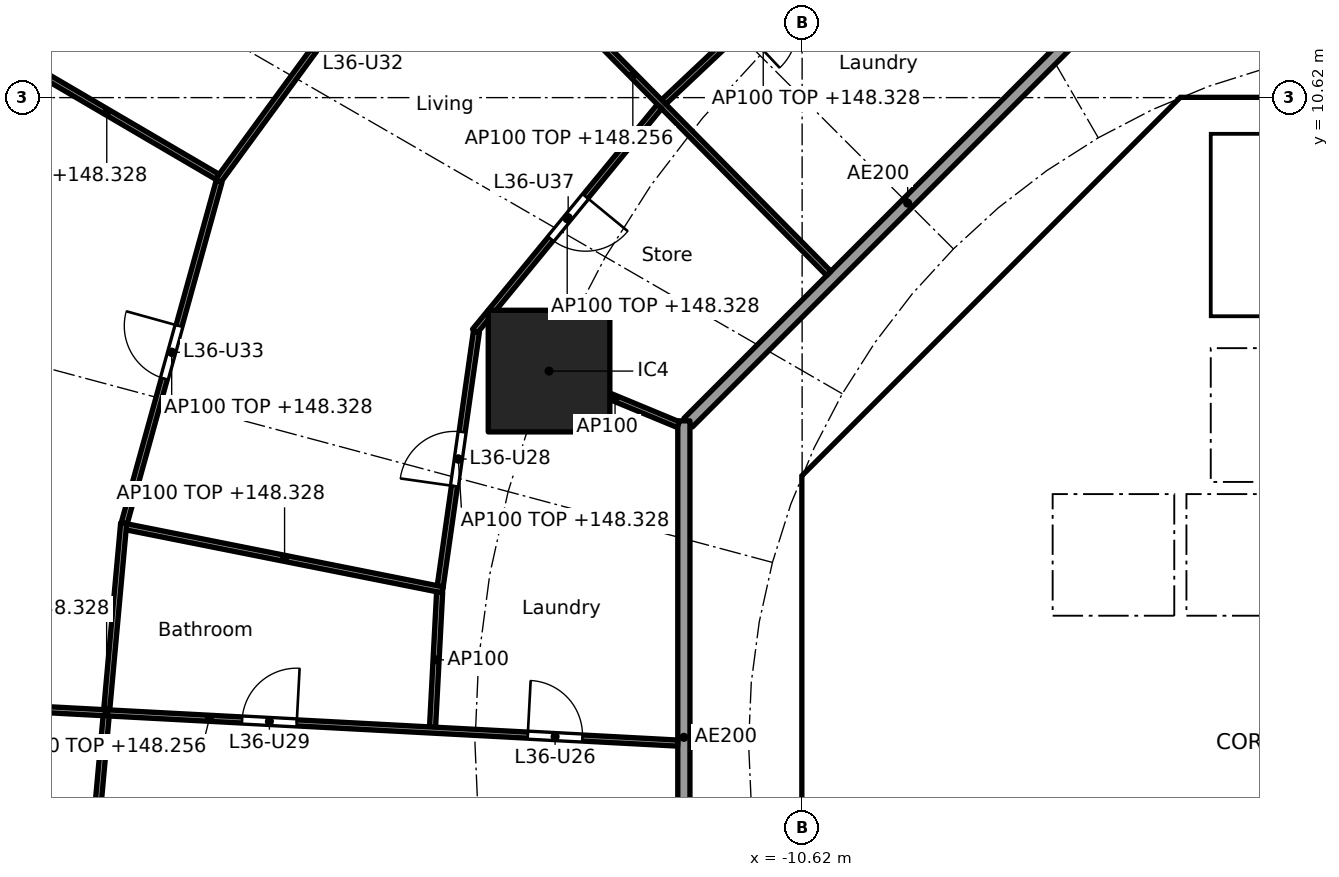
"""IFC4 building model, lengths in metres.
Left out: names, types, materials, properties, quantities, classifications, styles, units other than length and angle.
Written with IfcOpenShell. Run it as: python <this file> out.ifc"""

import sys

from ifc_helpers import new_model, si_unit, direction, frame, frame_2d, origin, origin_2d, place, context, subcontext, project, spatial, polyline, rectangle, outline, extrude, element, fill, save


model = new_model("IFC4")
c1 = context("Model", 3, precision=1e-05, world=origin(), true_north=direction((0.0, 1.0)))
c2 = subcontext(c1, "Body", "Model", "MODEL_VIEW")
j1 = project(units=[si_unit("LENGTHUNIT", "METRE"), si_unit("PLANEANGLEUNIT", "RADIAN")], contexts=[c1])
p1 = place(None, origin())
s1 = spatial("IfcSite", under=j1, at=p1, CompositionType="ELEMENT")
p2 = place(p1, origin())
s2 = spatial("IfcBuilding", under=s1, at=p2, CompositionType="ELEMENT")
p3 = place(p2, frame((0.0, 0.0, 145.5)))
s3 = spatial("IfcBuildingStorey", under=s2, at=p3, CompositionType="ELEMENT", Elevation=145.5)
p4 = place(p3, frame((-14.782, 6.123, 0.0), z_axis=(0.0, 0.0, 1.0), x_axis=(1.0, 0.0, 0.0)))
e1 = element("IfcColumn", 1, at=p4, inside=s3, PredefinedType="COLUMN", context=c2, shape_type="SweptSolid", body=[
    extrude(rectangle(XDim=2.0, YDim=2.0, at=origin_2d()), origin(), (0.0, 0.0, 1.0), 3.7),
])
p5 = place(p3, frame((-4.613, 9.988, 0.0), z_axis=(0.0, 0.0, 1.0), x_axis=(-0.707106781187, -0.707106781187, 0.0)))
e2 = element("IfcWall", 2, at=p5, inside=s3, PredefinedType="SHEAR", context=c2, shape_type="SweptSolid", body=[
    extrude(rectangle(XDim=7.602, YDim=0.6, at=frame_2d((3.801, 0.0))), origin(), (0.0, 0.0, 1.0), 3.44),
])
p6 = place(p5, frame((0.351, 0.0, 0.0)))
e3 = element("IfcOpeningElement", 3, at=p6, cuts=e2, PredefinedType="OPENING", context=c2, shape_type="SweptSolid", body=[
    extrude(rectangle(XDim=1.1, YDim=2.1, at=frame_2d((0.55, 1.05))), frame((0.0, 0.31, 0.0), z_axis=(0.0, -1.0, 0.0), x_axis=(1.0, 0.0, 0.0)), (0.0, 0.0, 1.0), 0.62),
])
p7 = place(p3, frame((-10.325, 3.801, 0.0), z_axis=(0.0, 0.0, 1.0), x_axis=(0.0, -1.0, 0.0)))
e4 = element("IfcWall", 4, at=p7, inside=s3, PredefinedType="SHEAR", context=c2, shape_type="SweptSolid", body=[
    extrude(rectangle(XDim=7.602, YDim=0.6, at=frame_2d((3.801, 0.0))), origin(), (0.0, 0.0, 1.0), 3.44),
])
p8 = place(p7, frame((0.651, 0.0, 0.0)))
e5 = element("IfcOpeningElement", 5, at=p8, cuts=e4, PredefinedType="OPENING", context=c2, shape_type="SweptSolid", body=[
    extrude(rectangle(XDim=1.5, YDim=2.1, at=frame_2d((0.75, 1.05))), frame((0.0, 0.31, 0.0), z_axis=(0.0, -1.0, 0.0), x_axis=(1.0, 0.0, 0.0)), (0.0, 0.0, 1.0), 0.62),
])
p9 = place(p7, frame((5.451, 0.0, 0.0)))
e6 = element("IfcOpeningElement", 6, at=p9, cuts=e4, PredefinedType="OPENING", context=c2, shape_type="SweptSolid", body=[
    extrude(rectangle(XDim=1.5, YDim=2.1, at=frame_2d((0.75, 1.05))), frame((0.0, 0.31, 0.0), z_axis=(0.0, -1.0, 0.0), x_axis=(1.0, 0.0, 0.0)), (0.0, 0.0, 1.0), 0.62),
])
p10 = place(p3, frame((-5.8, 4.3, 0.0), z_axis=(0.0, 0.0, 1.0), x_axis=(0.0, 1.0, 0.0)))
e7 = element("IfcWall", 7, at=p10, inside=s3, PredefinedType="PARTITIONING", context=c2, shape_type="SweptSolid", body=[
    extrude(rectangle(XDim=3.927, YDim=0.15, at=frame_2d((1.963, 0.0))), origin(), (0.0, 0.0, 1.0), 3.44),
])
p11 = place(p10, frame((0.413, 0.0, 0.0)))
e8 = element("IfcOpeningElement", 8, at=p11, cuts=e7, PredefinedType="OPENING", context=c2, shape_type="SweptSolid", body=[
    extrude(rectangle(XDim=0.9, YDim=2.1, at=frame_2d((0.45, 1.05))), frame((0.0, 0.085, 0.0), z_axis=(0.0, -1.0, 0.0), x_axis=(1.0, 0.0, 0.0)), (0.0, 0.0, 1.0), 0.17),
])
p12 = place(p10, frame((2.489, 0.0, 0.0)))
e9 = element("IfcOpeningElement", 9, at=p12, cuts=e7, PredefinedType="OPENING", context=c2, shape_type="SweptSolid", body=[
    extrude(rectangle(XDim=0.9, YDim=2.1, at=frame_2d((0.45, 1.05))), frame((0.0, 0.085, 0.0), z_axis=(0.0, -1.0, 0.0), x_axis=(1.0, 0.0, 0.0)), (0.0, 0.0, 1.0), 0.17),
])
p13 = place(p3, frame((-4.0, 4.3, 0.0), z_axis=(0.0, 0.0, 1.0), x_axis=(0.0, 1.0, 0.0)))
e10 = element("IfcWall", 10, at=p13, inside=s3, PredefinedType="SOLIDWALL", context=c2, shape_type="SweptSolid", body=[
    extrude(rectangle(XDim=2.2, YDim=0.2, at=frame_2d((1.1, 0.0))), origin(), (0.0, 0.0, 1.0), 3.44),
])
p14 = place(p13, frame((0.55, 0.0, 0.0)))
e11 = element("IfcOpeningElement", 11, at=p14, cuts=e10, PredefinedType="OPENING", context=c2, shape_type="SweptSolid", body=[
    extrude(rectangle(XDim=1.1, YDim=2.1, at=frame_2d((0.55, 1.05))), frame((0.0, 0.11, 0.0), z_axis=(0.0, -1.0, 0.0), x_axis=(1.0, 0.0, 0.0)), (0.0, 0.0, 1.0), 0.22),
])
p15 = place(p3, frame((-6.7, 2.0, 0.0), z_axis=(0.0, 0.0, 1.0), x_axis=(1.0, 0.0, 0.0)))
e12 = element("IfcWall", 12, at=p15, inside=s3, PredefinedType="SOLIDWALL", context=c2, shape_type="SweptSolid", body=[
    extrude(rectangle(XDim=13.4, YDim=0.2, at=frame_2d((6.7, 0.0))), origin(), (0.0, 0.0, 1.0), 3.44),
])
p16 = place(p15, frame((0.65, 0.0, 0.0)))
e13 = element("IfcOpeningElement", 13, at=p16, cuts=e12, PredefinedType="OPENING", context=c2, shape_type="SweptSolid", body=[
    extrude(rectangle(XDim=1.1, YDim=2.1, at=frame_2d((0.55, 1.05))), frame((0.0, 0.11, 0.0), z_axis=(0.0, -1.0, 0.0), x_axis=(1.0, 0.0, 0.0)), (0.0, 0.0, 1.0), 0.22),
])
p17 = place(p15, frame((2.85, 0.0, 0.0)))
e14 = element("IfcOpeningElement", 14, at=p17, cuts=e12, PredefinedType="OPENING", context=c2, shape_type="SweptSolid", body=[
    extrude(rectangle(XDim=1.1, YDim=2.1, at=frame_2d((0.55, 1.05))), frame((0.0, 0.11, 0.0), z_axis=(0.0, -1.0, 0.0), x_axis=(1.0, 0.0, 0.0)), (0.0, 0.0, 1.0), 0.22),
])
p18 = place(p15, frame((5.05, 0.0, 0.0)))
e15 = element("IfcOpeningElement", 15, at=p18, cuts=e12, PredefinedType="OPENING", context=c2, shape_type="SweptSolid", body=[
    extrude(rectangle(XDim=1.1, YDim=2.1, at=frame_2d((0.55, 1.05))), frame((0.0, 0.11, 0.0), z_axis=(0.0, -1.0, 0.0), x_axis=(1.0, 0.0, 0.0)), (0.0, 0.0, 1.0), 0.22),
])
p19 = place(p3, origin())
e16 = element("IfcWall", 16, at=p19, inside=s3, PredefinedType="SHEAR", context=c2, shape_type="SweptSolid", body=[
    extrude(outline(polyline([(-10.2, 4.825), (-9.776, 4.401), (-10.025, 4.152), (-10.025, 3.801), (-10.625, 3.801), (-10.625, 4.401), (-10.2, 4.825)])), origin(), (0.0, 0.0, 1.0), 3.44),
])
p20 = place(p3, origin())
e17 = element("IfcWall", 17, at=p20, inside=s3, PredefinedType="SHEAR", context=c2, shape_type="SweptSolid", body=[
    extrude(outline(polyline([(-4.152, 10.025), (-4.401, 9.776), (-4.825, 10.2), (-4.401, 10.625), (4.401, 10.625), (4.825, 10.2), (4.401, 9.776), (4.152, 10.025), (-4.152, 10.025)])), origin(), (0.0, 0.0, 1.0), 3.44),
])
p21 = place(p3, frame((-10.025, 4.0, 0.0), z_axis=(0.0, 0.0, 1.0), x_axis=(1.0, 0.0, 0.0)))
e18 = element("IfcWall", 18, at=p21, inside=s3, PredefinedType="PARTITIONING", context=c2, shape_type="SweptSolid", body=[
    extrude(rectangle(XDim=3.325, YDim=0.2, at=frame_2d((1.662, 0.0))), origin(), (0.0, 0.0, 1.0), 3.44),
])
p22 = place(p3, frame((-8.001, 6.1, 0.0), z_axis=(0.0, 0.0, 1.0), x_axis=(1.0, 0.0, 0.0)))
e19 = element("IfcWall", 19, at=p22, inside=s3, PredefinedType="PARTITIONING", context=c2, shape_type="SweptSolid", body=[
    extrude(rectangle(XDim=2.126, YDim=0.15, at=frame_2d((1.063, 0.0))), origin(), (0.0, 0.0, 1.0), 3.44),
])
p23 = place(p3, origin())
e20 = element("IfcWall", 20, at=p23, inside=s3, PredefinedType="SOLIDWALL", context=c2, shape_type="SweptSolid", body=[
    extrude(outline(polyline([(-6.5, 2.1), (-6.7, 2.1), (-6.7, 4.3), (6.7, 4.3), (6.7, 2.1), (6.5, 2.1), (6.5, 4.1), (4.5, 4.1), (4.5, 2.1), (4.3, 2.1), (4.3, 4.1), (2.3, 4.1), (2.3, 2.1), (2.1, 2.1), (2.1, 4.1), (0.1, 4.1), (0.1, 2.1), (-0.1, 2.1), (-0.1, 4.1), (-2.1, 4.1), (-2.1, 2.1), (-2.3, 2.1), (-2.3, 4.1), (-4.3, 4.1), (-4.3, 2.1), (-4.5, 2.1), (-4.5, 4.1), (-6.5, 4.1), (-6.5, 2.1)])), origin(), (0.0, 0.0, 1.0), 3.44),
])
p24 = place(p3, origin())
e21 = element("IfcWall", 21, at=p24, inside=s3, PredefinedType="SOLIDWALL", context=c2, shape_type="SweptSolid", body=[
    extrude(outline(polyline([(-3.9, 7.025), (-4.1, 7.025), (-4.1, 10.025), (-3.9, 10.025), (-3.9, 7.025)])), origin(), (0.0, 0.0, 1.0), 3.44),
])
p25 = place(p3, origin())
e22 = element("IfcWall", 22, at=p25, inside=s3, PredefinedType="SOLIDWALL", context=c2, shape_type="SweptSolid", body=[
    extrude(outline(polyline([(4.1, 6.5), (-4.1, 6.5), (-4.1, 7.025), (4.1, 7.025), (4.1, 6.5)])), origin(), (0.0, 0.0, 1.0), 3.44),
])
p26 = place(p3, frame((-5.275, 12.494, 0.0), z_axis=(0.0, 0.0, 1.0), x_axis=(-0.707106781187, -0.707106781187, 0.0)))
e23 = element("IfcWall", 23, at=p26, inside=s3, PredefinedType="PARTITIONING", context=c2, shape_type="SweptSolid", body=[
    extrude(rectangle(XDim=10.209, YDim=0.2, at=frame_2d((5.104, 0.0))), origin(), (0.0, 0.0, 1.0), 3.44),
])
p27 = place(p3, frame((-12.565, 5.304, 0.0), z_axis=(0.0, 0.0, 1.0), x_axis=(0.0, -1.0, 0.0)))
e24 = element("IfcWall", 24, at=p27, inside=s3, PredefinedType="PARTITIONING", context=c2, shape_type="SweptSolid", body=[
    extrude(rectangle(XDim=10.409, YDim=0.2, at=frame_2d((5.205, 0.0))), origin(), (0.0, 0.0, 1.0), 3.44),
])
p28 = place(p27, frame((6.539, 0.0, 0.0)))
e25 = element("IfcOpeningElement", 25, at=p28, cuts=e24, PredefinedType="OPENING", context=c2, shape_type="SweptSolid", body=[
    extrude(rectangle(XDim=1.0, YDim=2.1, at=frame_2d((0.5, 1.05))), frame((0.0, 0.11, 0.0), z_axis=(0.0, -1.0, 0.0), x_axis=(1.0, 0.0, 0.0)), (0.0, 0.0, 1.0), 0.22),
])
p29 = place(p3, frame((-9.622, 13.634, 0.0), z_axis=(0.0, 0.0, 1.0), x_axis=(-0.727710859679, -0.685884031528, 0.0)))
e26 = element("IfcWall", 26, at=p29, inside=s3, PredefinedType="PARTITIONING", context=c2, shape_type="SweptSolid", body=[
    extrude(rectangle(XDim=4.5, YDim=0.1, at=frame_2d((2.25, 0.0))), origin(), (0.0, 0.0, 1.0), 2.828),
])
p30 = place(p29, frame((1.825, 0.0, 0.0)))
e27 = element("IfcOpeningElement", 27, at=p30, cuts=e26, PredefinedType="OPENING", context=c2, shape_type="SweptSolid", body=[
    extrude(rectangle(XDim=0.9, YDim=2.1, at=frame_2d((0.45, 1.05))), frame((0.0, 0.06, 0.0), z_axis=(0.0, -1.0, 0.0), x_axis=(1.0, 0.0, 0.0)), (0.0, 0.0, 1.0), 0.12),
])
p31 = place(p3, frame((-10.182, 7.729, 0.0), z_axis=(0.0, 0.0, 1.0), x_axis=(-0.702927211734, 0.711261790766, 0.0)))
e28 = element("IfcWall", 28, at=p31, inside=s3, PredefinedType="PARTITIONING", context=c2, shape_type="SweptSolid", body=[
    extrude(rectangle(XDim=9.168, YDim=0.1, at=frame_2d((4.584, 0.0))), origin(), (0.0, 0.0, 1.0), 2.756),
])
p32 = place(p31, frame((6.067, 0.0, 0.0)))
e29 = element("IfcOpeningElement", 29, at=p32, cuts=e28, PredefinedType="OPENING", context=c2, shape_type="SweptSolid", body=[
    extrude(rectangle(XDim=0.9, YDim=2.1, at=frame_2d((0.45, 1.05))), frame((0.0, 0.06, 0.0), z_axis=(0.0, -1.0, 0.0), x_axis=(1.0, 0.0, 0.0)), (0.0, 0.0, 1.0), 0.12),
])
p33 = place(p3, frame((-12.965, 10.475, 0.0), z_axis=(0.0, 0.0, 1.0), x_axis=(-0.634932102074, -0.772567942485, 0.0)))
e30 = element("IfcWall", 30, at=p33, inside=s3, PredefinedType="PARTITIONING", context=c2, shape_type="SweptSolid", body=[
    extrude(rectangle(XDim=4.782, YDim=0.1, at=frame_2d((2.391, 0.0))), origin(), (0.0, 0.0, 1.0), 2.828),
])
p34 = place(p33, frame((1.916, 0.0, 0.0)))
e31 = element("IfcOpeningElement", 31, at=p34, cuts=e30, PredefinedType="OPENING", context=c2, shape_type="SweptSolid", body=[
    extrude(rectangle(XDim=0.9, YDim=2.1, at=frame_2d((0.45, 1.05))), frame((0.0, 0.06, 0.0), z_axis=(0.0, -1.0, 0.0), x_axis=(1.0, 0.0, 0.0)), (0.0, 0.0, 1.0), 0.12),
])
p35 = place(p3, frame((-16.621, 14.174, 0.0), z_axis=(0.0, 0.0, 1.0), x_axis=(-0.590672767272, -0.806911198338, 0.0)))
e32 = element("IfcWall", 32, at=p35, inside=s3, PredefinedType="PARTITIONING", context=c2, shape_type="SweptSolid", body=[
    extrude(rectangle(XDim=6.099, YDim=0.1, at=frame_2d((3.05, 0.0))), origin(), (0.0, 0.0, 1.0), 2.828),
])
p36 = place(p35, frame((2.574, 0.0, 0.0)))
e33 = element("IfcOpeningElement", 33, at=p36, cuts=e32, PredefinedType="OPENING", context=c2, shape_type="SweptSolid", body=[
    extrude(rectangle(XDim=0.9, YDim=2.1, at=frame_2d((0.45, 1.05))), frame((0.0, 0.06, 0.0), z_axis=(0.0, -1.0, 0.0), x_axis=(1.0, 0.0, 0.0)), (0.0, 0.0, 1.0), 0.12),
])
p37 = place(p3, frame((-12.657, 5.243, 0.0), z_axis=(0.0, 0.0, 1.0), x_axis=(-0.923864733477, 0.382719158442, 0.0)))
e34 = element("IfcWall", 34, at=p37, inside=s3, PredefinedType="PARTITIONING", context=c2, shape_type="SweptSolid", body=[
    extrude(rectangle(XDim=2.25, YDim=0.1, at=frame_2d((1.125, 0.0))), origin(), (0.0, 0.0, 1.0), 3.44),
])
p38 = place(p3, frame((-15.977, 6.769, 0.0), z_axis=(0.0, 0.0, 1.0), x_axis=(-0.140693592547, -0.990053186963, 0.0)))
e35 = element("IfcWall", 35, at=p38, inside=s3, PredefinedType="PARTITIONING", context=c2, shape_type="SweptSolid", body=[
    extrude(rectangle(XDim=4.227, YDim=0.1, at=frame_2d((2.114, 0.0))), origin(), (0.0, 0.0, 1.0), 2.828),
])
p39 = place(p38, frame((1.664, 0.0, 0.0)))
e36 = element("IfcOpeningElement", 36, at=p39, cuts=e35, PredefinedType="OPENING", context=c2, shape_type="SweptSolid", body=[
    extrude(rectangle(XDim=0.9, YDim=2.1, at=frame_2d((0.45, 1.05))), frame((0.0, 0.06, 0.0), z_axis=(0.0, -1.0, 0.0), x_axis=(1.0, 0.0, 0.0)), (0.0, 0.0, 1.0), 0.12),
])
p40 = place(p3, frame((-20.237, 9.319, 0.0), z_axis=(0.0, 0.0, 1.0), x_axis=(-0.862867843769, 0.505429603593, 0.0)))
e37 = element("IfcWall", 37, at=p40, inside=s3, PredefinedType="PARTITIONING", context=c2, shape_type="SweptSolid", body=[
    extrude(rectangle(XDim=4.215, YDim=0.1, at=frame_2d((2.107, 0.0))), origin(), (0.0, 0.0, 1.0), 2.828),
])
p41 = place(p3, frame((-20.207, 9.245, 0.0), z_axis=(0.0, 0.0, 1.0), x_axis=(-0.267400122135, -0.963585582438, 0.0)))
e38 = element("IfcWall", 38, at=p41, inside=s3, PredefinedType="PARTITIONING", context=c2, shape_type="SweptSolid", body=[
    extrude(rectangle(XDim=5.838, YDim=0.1, at=frame_2d((2.919, 0.0))), origin(), (0.0, 0.0, 1.0), 2.828),
])
p42 = place(p41, frame((2.469, 0.0, 0.0)))
e39 = element("IfcOpeningElement", 39, at=p42, cuts=e38, PredefinedType="OPENING", context=c2, shape_type="SweptSolid", body=[
    extrude(rectangle(XDim=0.9, YDim=2.1, at=frame_2d((0.45, 1.05))), frame((0.0, 0.06, 0.0), z_axis=(0.0, -1.0, 0.0), x_axis=(1.0, 0.0, 0.0)), (0.0, 0.0, 1.0), 0.12),
])
p43 = place(p3, frame((-16.53, 2.525, 0.0), z_axis=(0.0, 0.0, 1.0), x_axis=(-0.980716720387, 0.195434680531, 0.0)))
e40 = element("IfcWall", 40, at=p43, inside=s3, PredefinedType="PARTITIONING", context=c2, shape_type="SweptSolid", body=[
    extrude(rectangle(XDim=5.305, YDim=0.1, at=frame_2d((2.653, 0.0))), origin(), (0.0, 0.0, 1.0), 2.828),
])
p44 = place(p3, frame((-16.581, 2.485, 0.0), z_axis=(0.0, 0.0, 1.0), x_axis=(-0.052455156936, -0.998623280577, 0.0)))
e41 = element("IfcWall", 41, at=p44, inside=s3, PredefinedType="PARTITIONING", context=c2, shape_type="SweptSolid", body=[
    extrude(rectangle(XDim=2.225, YDim=0.1, at=frame_2d((1.112, 0.0))), origin(), (0.0, 0.0, 1.0), 3.44),
])
p45 = place(p3, frame((-21.777, 3.621, 0.0), z_axis=(0.0, 0.0, 1.0), x_axis=(-0.090606877484, -0.995886737412, 0.0)))
e42 = element("IfcWall", 42, at=p45, inside=s3, PredefinedType="PARTITIONING", context=c2, shape_type="SweptSolid", body=[
    extrude(rectangle(XDim=6.189, YDim=0.1, at=frame_2d((3.095, 0.0))), origin(), (0.0, 0.0, 1.0), 2.828),
])
p46 = place(p3, frame((-12.665, 0.005, 0.0), z_axis=(0.0, 0.0, 1.0), x_axis=(-0.998599229025, 0.052911055468, 0.0)))
e43 = element("IfcWall", 43, at=p46, inside=s3, PredefinedType="PARTITIONING", context=c2, shape_type="SweptSolid", body=[
    extrude(rectangle(XDim=15.425, YDim=0.1, at=frame_2d((7.713, 0.0))), origin(), (0.0, 0.0, 1.0), 2.756),
])
p47 = place(p46, frame((1.571, 0.0, 0.0)))
e44 = element("IfcOpeningElement", 44, at=p47, cuts=e43, PredefinedType="OPENING", context=c2, shape_type="SweptSolid", body=[
    extrude(rectangle(XDim=0.9, YDim=2.1, at=frame_2d((0.45, 1.05))), frame((0.0, 0.06, 0.0), z_axis=(0.0, -1.0, 0.0), x_axis=(1.0, 0.0, 0.0)), (0.0, 0.0, 1.0), 0.12),
])
p48 = place(p46, frame((6.276, 0.0, 0.0)))
e45 = element("IfcOpeningElement", 45, at=p48, cuts=e43, PredefinedType="OPENING", context=c2, shape_type="SweptSolid", body=[
    extrude(rectangle(XDim=0.9, YDim=2.1, at=frame_2d((0.45, 1.05))), frame((0.0, 0.06, 0.0), z_axis=(0.0, -1.0, 0.0), x_axis=(1.0, 0.0, 0.0)), (0.0, 0.0, 1.0), 0.12),
])
p49 = place(p46, frame((11.967, 0.0, 0.0)))
e46 = element("IfcOpeningElement", 46, at=p49, cuts=e43, PredefinedType="OPENING", context=c2, shape_type="SweptSolid", body=[
    extrude(rectangle(XDim=0.9, YDim=2.1, at=frame_2d((0.45, 1.05))), frame((0.0, 0.06, 0.0), z_axis=(0.0, -1.0, 0.0), x_axis=(1.0, 0.0, 0.0)), (0.0, 0.0, 1.0), 0.12),
])
p50 = place(p16, origin())
e47 = element("IfcDoor", 47, at=p50, inside=s3, OperationType="DOUBLE_DOOR_SLIDING", PredefinedType="DOOR", context=c2, shape_type="SweptSolid", body=[
    extrude(rectangle(XDim=1.1, YDim=2.1, at=frame_2d((0.55, 1.05))), frame((0.0, 0.025, 0.0), z_axis=(0.0, -1.0, 0.0), x_axis=(1.0, 0.0, 0.0)), (0.0, 0.0, 1.0), 0.05),
])
fill(e13, e47)
p51 = place(p17, origin())
e48 = element("IfcDoor", 48, at=p51, inside=s3, OperationType="DOUBLE_DOOR_SLIDING", PredefinedType="DOOR", context=c2, shape_type="SweptSolid", body=[
    extrude(rectangle(XDim=1.1, YDim=2.1, at=frame_2d((0.55, 1.05))), frame((0.0, 0.025, 0.0), z_axis=(0.0, -1.0, 0.0), x_axis=(1.0, 0.0, 0.0)), (0.0, 0.0, 1.0), 0.05),
])
fill(e14, e48)
p52 = place(p14, origin())
e49 = element("IfcDoor", 49, at=p52, inside=s3, OperationType="DOUBLE_DOOR_SLIDING", PredefinedType="DOOR", context=c2, shape_type="SweptSolid", body=[
    extrude(rectangle(XDim=1.1, YDim=2.1, at=frame_2d((0.55, 1.05))), frame((0.0, 0.025, 0.0), z_axis=(0.0, -1.0, 0.0), x_axis=(1.0, 0.0, 0.0)), (0.0, 0.0, 1.0), 0.05),
])
fill(e11, e49)
p53 = place(p11, origin())
e50 = element("IfcDoor", 50, at=p53, inside=s3, OperationType="SINGLE_SWING_RIGHT", PredefinedType="DOOR", context=c2, shape_type="SweptSolid", body=[
    extrude(rectangle(XDim=0.9, YDim=2.1, at=frame_2d((0.45, 1.05))), frame((0.0, 0.025, 0.0), z_axis=(0.0, -1.0, 0.0), x_axis=(1.0, 0.0, 0.0)), (0.0, 0.0, 1.0), 0.05),
])
fill(e8, e50)
p54 = place(p12, origin())
e51 = element("IfcDoor", 51, at=p54, inside=s3, OperationType="SINGLE_SWING_RIGHT", PredefinedType="DOOR", context=c2, shape_type="SweptSolid", body=[
    extrude(rectangle(XDim=0.9, YDim=2.1, at=frame_2d((0.45, 1.05))), frame((0.0, 0.025, 0.0), z_axis=(0.0, -1.0, 0.0), x_axis=(1.0, 0.0, 0.0)), (0.0, 0.0, 1.0), 0.05),
])
fill(e9, e51)
p55 = place(p8, origin())
e52 = element("IfcDoor", 52, at=p55, inside=s3, OperationType="DOUBLE_DOOR_SINGLE_SWING", PredefinedType="DOOR", context=c2, shape_type="SweptSolid", body=[
    extrude(rectangle(XDim=1.5, YDim=2.1, at=frame_2d((0.75, 1.05))), frame((0.0, 0.025, 0.0), z_axis=(0.0, -1.0, 0.0), x_axis=(1.0, 0.0, 0.0)), (0.0, 0.0, 1.0), 0.05),
])
fill(e5, e52)
p56 = place(p6, origin())
e53 = element("IfcDoor", 53, at=p56, inside=s3, OperationType="SINGLE_SWING_LEFT", PredefinedType="DOOR", context=c2, shape_type="SweptSolid", body=[
    extrude(rectangle(XDim=1.1, YDim=2.1, at=frame_2d((0.55, 1.05))), frame((0.0, 0.025, 0.0), z_axis=(0.0, -1.0, 0.0), x_axis=(1.0, 0.0, 0.0)), (0.0, 0.0, 1.0), 0.05),
])
fill(e3, e53)
p57 = place(p47, frame((0.9, 0.0, 0.0), x_axis=(-1.0, 0.0, 0.0)))
e54 = element("IfcDoor", 54, at=p57, inside=s3, OperationType="SINGLE_SWING_LEFT", PredefinedType="DOOR", context=c2, shape_type="SweptSolid", body=[
    extrude(rectangle(XDim=0.9, YDim=2.1, at=frame_2d((0.45, 1.05))), frame((0.0, 0.025, 0.0), z_axis=(0.0, -1.0, 0.0), x_axis=(1.0, 0.0, 0.0)), (0.0, 0.0, 1.0), 0.05),
])
fill(e44, e54)
p58 = place(p39, frame((0.9, 0.0, 0.0), x_axis=(-1.0, 0.0, 0.0)))
e55 = element("IfcDoor", 55, at=p58, inside=s3, OperationType="SINGLE_SWING_LEFT", PredefinedType="DOOR", context=c2, shape_type="SweptSolid", body=[
    extrude(rectangle(XDim=0.9, YDim=2.1, at=frame_2d((0.45, 1.05))), frame((0.0, 0.025, 0.0), z_axis=(0.0, -1.0, 0.0), x_axis=(1.0, 0.0, 0.0)), (0.0, 0.0, 1.0), 0.05),
])
fill(e36, e55)
p59 = place(p48, frame((0.9, 0.0, 0.0), x_axis=(-1.0, 0.0, 0.0)))
e56 = element("IfcDoor", 56, at=p59, inside=s3, OperationType="SINGLE_SWING_RIGHT", PredefinedType="DOOR", context=c2, shape_type="SweptSolid", body=[
    extrude(rectangle(XDim=0.9, YDim=2.1, at=frame_2d((0.45, 1.05))), frame((0.0, 0.025, 0.0), z_axis=(0.0, -1.0, 0.0), x_axis=(1.0, 0.0, 0.0)), (0.0, 0.0, 1.0), 0.05),
])
fill(e45, e56)
p60 = place(p36, frame((0.9, 0.0, 0.0), x_axis=(-1.0, 0.0, 0.0)))
e57 = element("IfcDoor", 57, at=p60, inside=s3, OperationType="SINGLE_SWING_LEFT", PredefinedType="DOOR", context=c2, shape_type="SweptSolid", body=[
    extrude(rectangle(XDim=0.9, YDim=2.1, at=frame_2d((0.45, 1.05))), frame((0.0, 0.025, 0.0), z_axis=(0.0, -1.0, 0.0), x_axis=(1.0, 0.0, 0.0)), (0.0, 0.0, 1.0), 0.05),
])
fill(e33, e57)
p61 = place(p42, frame((0.9, 0.0, 0.0), x_axis=(-1.0, 0.0, 0.0)))
e58 = element("IfcDoor", 58, at=p61, inside=s3, OperationType="SINGLE_SWING_RIGHT", PredefinedType="DOOR", context=c2, shape_type="SweptSolid", body=[
    extrude(rectangle(XDim=0.9, YDim=2.1, at=frame_2d((0.45, 1.05))), frame((0.0, 0.025, 0.0), z_axis=(0.0, -1.0, 0.0), x_axis=(1.0, 0.0, 0.0)), (0.0, 0.0, 1.0), 0.05),
])
fill(e39, e58)
p62 = place(p34, origin())
e59 = element("IfcDoor", 59, at=p62, inside=s3, OperationType="SINGLE_SWING_LEFT", PredefinedType="DOOR", context=c2, shape_type="SweptSolid", body=[
    extrude(rectangle(XDim=0.9, YDim=2.1, at=frame_2d((0.45, 1.05))), frame((0.0, 0.025, 0.0), z_axis=(0.0, -1.0, 0.0), x_axis=(1.0, 0.0, 0.0)), (0.0, 0.0, 1.0), 0.05),
])
fill(e31, e59)
save(model, sys.argv[1])
